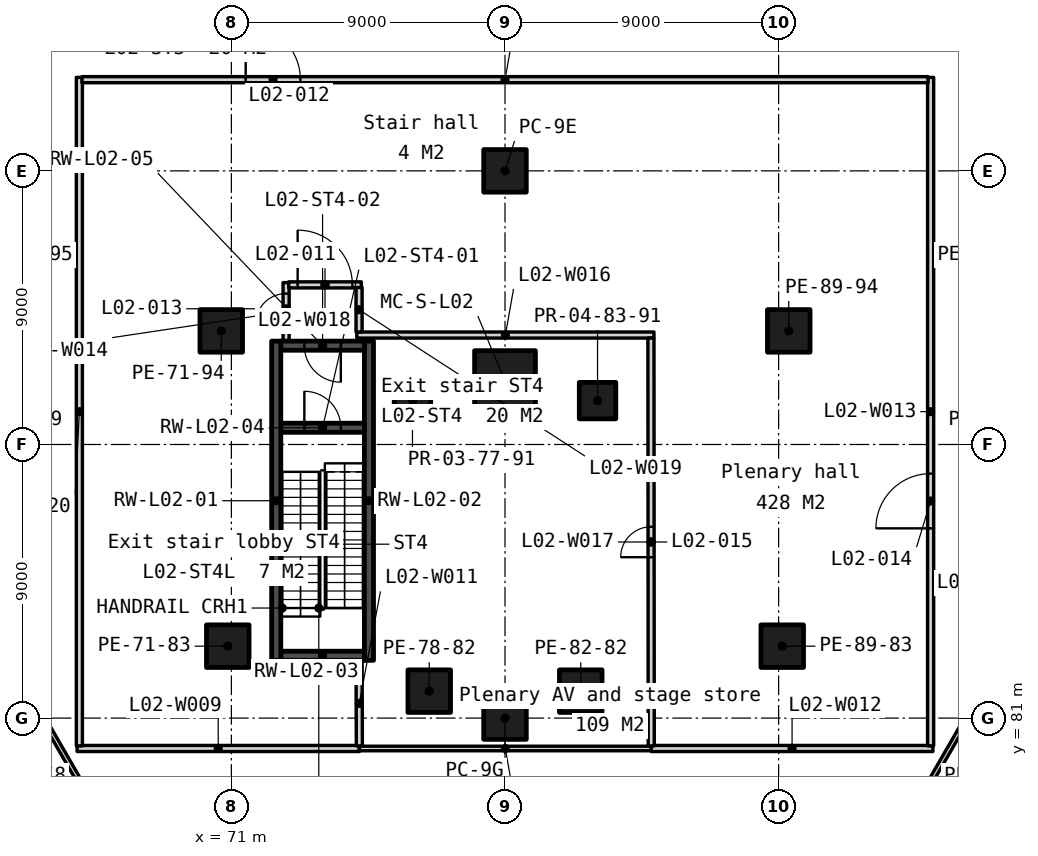
"""IFC4 building model, lengths in metres.
Left out: names, types, materials, properties, quantities, classifications, styles, units other than length and angle.
Written with IfcOpenShell. Run it as: python <this file> out.ifc"""

import sys

from ifc_helpers import new_model, si_unit, direction, frame, frame_2d, origin, origin_2d, place, context, subcontext, project, spatial, rectangle, extrude, element, fill, save


model = new_model("IFC4")
c1 = context("Model", 3, precision=1e-05, world=origin(), true_north=direction((0.0, 1.0)))
c2 = subcontext(c1, "Body", "Model", "MODEL_VIEW")
j1 = project(units=[si_unit("LENGTHUNIT", "METRE"), si_unit("PLANEANGLEUNIT", "RADIAN")], contexts=[c1])
p1 = place(None, origin())
s1 = spatial("IfcSite", under=j1, at=p1, CompositionType="ELEMENT")
p2 = place(p1, origin())
s2 = spatial("IfcBuilding", under=s1, at=p2, CompositionType="ELEMENT")
p3 = place(p2, frame((0.0, 0.0, 13.5)))
s3 = spatial("IfcBuildingStorey", under=s2, at=p3, CompositionType="ELEMENT", Elevation=13.5)
for number, where, z_axis, x_axis in (
    (1, (80.0, 99.0, 0.0), (0.0, 0.0, 1.0), (1.0, 0.0, 0.0)),
    (2, (80.0, 81.0, 0.0), (0.0, 0.0, 1.0), (1.0, 0.0, 0.0)),
    (3, (70.881, 83.366, 0.0), (0.0, 0.0, 1.0), (1.0, 0.0, 0.0)),
    (4, (70.667, 93.736, 0.0), (0.0, 0.0, 1.0), (1.0, 0.0, 0.0)),
    (5, (77.508, 81.886, 0.0), (0.0, 0.0, 1.0), (1.0, 0.0, 0.0)),
    (6, (82.492, 81.886, 0.0), (0.0, 0.0, 1.0), (1.0, 0.0, 0.0)),
    (7, (89.119, 83.366, 0.0), (0.0, 0.0, 1.0), (1.0, 0.0, 0.0)),
    (8, (89.333, 93.736, 0.0), (0.0, 0.0, 1.0), (1.0, 0.0, 0.0)),
):
    element("IfcColumn", number, at=place(p3, frame(where, z_axis=z_axis, x_axis=x_axis)), inside=s3, PredefinedType="COLUMN", context=c2, shape_type="SweptSolid", body=[
        extrude(rectangle(XDim=1.4, YDim=1.4, at=origin_2d()), origin(), (0.0, 0.0, 1.0), 6.0),
    ])
for number, where, z_axis, x_axis in (
    (9, (76.956, 91.442, 0.0), (0.0, 0.0, 1.0), (1.0, 0.0, 0.0)),
    (10, (83.044, 91.442, 0.0), (0.0, 0.0, 1.0), (1.0, 0.0, 0.0)),
):
    element("IfcColumn", number, at=place(p3, frame(where, z_axis=z_axis, x_axis=x_axis)), inside=s3, PredefinedType="COLUMN", context=c2, shape_type="SweptSolid", body=[
        extrude(rectangle(XDim=1.2, YDim=1.2, at=origin_2d()), origin(), (0.0, 0.0, 1.0), 6.0),
    ])
p4 = place(p3, frame((80.0, 92.086, 0.0), z_axis=(0.0, 0.0, 1.0), x_axis=(1.0, 0.0, 0.0)))
e11 = element("IfcColumn", 11, at=p4, inside=s3, PredefinedType="COLUMN", context=c2, shape_type="SweptSolid", body=[
    extrude(rectangle(XDim=2.0, YDim=2.0, at=origin_2d()), origin(), (0.0, 0.0, 1.0), 6.0),
])
for number, where, z_axis, x_axis in (
    (12, (72.475, 82.9, 0.0), (0.0, 0.0, 1.0), (0.0, 1.0, 0.0)),
    (13, (75.525, 82.9, 0.0), (0.0, 0.0, 1.0), (0.0, 1.0, 0.0)),
):
    element("IfcWall", number, at=place(p3, frame(where, z_axis=z_axis, x_axis=x_axis)), inside=s3, PredefinedType="SOLIDWALL", context=c2, shape_type="SweptSolid", body=[
        extrude(rectangle(XDim=10.5, YDim=0.3, at=frame_2d((5.25, 0.0))), origin(), (0.0, 0.0, 1.0), 5.75),
    ])
p5 = place(p3, frame((72.625, 83.05, 0.0), z_axis=(0.0, 0.0, 1.0), x_axis=(1.0, 0.0, 0.0)))
e14 = element("IfcWall", 14, at=p5, inside=s3, PredefinedType="SOLIDWALL", context=c2, shape_type="SweptSolid", body=[
    extrude(rectangle(XDim=2.75, YDim=0.3, at=frame_2d((1.375, 0.0))), origin(), (0.0, 0.0, 1.0), 5.75),
])
p6 = place(p3, frame((72.625, 90.55, 0.0), z_axis=(0.0, 0.0, 1.0), x_axis=(1.0, 0.0, 0.0)))
e15 = element("IfcWall", 15, at=p6, inside=s3, PredefinedType="SOLIDWALL", context=c2, shape_type="SweptSolid", body=[
    extrude(rectangle(XDim=2.75, YDim=0.3, at=frame_2d((1.375, 0.0))), origin(), (0.0, 0.0, 1.0), 5.75),
])
p7 = place(p6, frame((0.775, 0.0, 0.0)))
e16 = element("IfcOpeningElement", 16, at=p7, cuts=e15, PredefinedType="OPENING", context=c2, shape_type="SweptSolid", body=[
    extrude(rectangle(XDim=1.2, YDim=2.1, at=frame_2d((0.6, 1.05))), frame((0.0, 0.16, 0.0), z_axis=(0.0, -1.0, 0.0), x_axis=(1.0, 0.0, 0.0)), (0.0, 0.0, 1.0), 0.32),
])
p8 = place(p3, frame((72.625, 93.25, 0.0), z_axis=(0.0, 0.0, 1.0), x_axis=(1.0, 0.0, 0.0)))
e17 = element("IfcWall", 17, at=p8, inside=s3, PredefinedType="SOLIDWALL", context=c2, shape_type="SweptSolid", body=[
    extrude(rectangle(XDim=2.75, YDim=0.3, at=frame_2d((1.375, 0.0))), origin(), (0.0, 0.0, 1.0), 5.75),
])
p9 = place(p8, frame((0.775, 0.0, 0.0)))
e18 = element("IfcOpeningElement", 18, at=p9, cuts=e17, PredefinedType="OPENING", context=c2, shape_type="SweptSolid", body=[
    extrude(rectangle(XDim=1.2, YDim=2.1, at=frame_2d((0.6, 1.05))), frame((0.0, 0.16, 0.0), z_axis=(0.0, -1.0, 0.0), x_axis=(1.0, 0.0, 0.0)), (0.0, 0.0, 1.0), 0.32),
])
for number, where, z_axis, x_axis in (
    (19, (133.302, 129.091, 0.0), (0.0, 0.0, 1.0), (-0.5, -0.866, 0.0)),
    (20, (77.166, 41.679, 0.0), (0.0, 0.0, 1.0), (-0.5, 0.866, 0.0)),
):
    element("IfcWall", number, at=place(p3, frame(where, z_axis=z_axis, x_axis=x_axis)), inside=s3, PredefinedType="STANDARD", context=c2, shape_type="SweptSolid", body=[
        extrude(rectangle(XDim=100.935, YDim=1.0, at=frame_2d((50.467, 0.0))), origin(), (0.0, 0.0, 1.0), 0.6),
    ])
p10 = place(p3, frame((44.88, 115.5, 0.0), z_axis=(0.0, 0.0, 1.0), x_axis=(0.499996841654, -0.866027227249, 0.0)))
e21 = element("IfcWall", 21, at=p10, inside=s3, PredefinedType="PARTITIONING", context=c2, shape_type="SweptSolid", body=[
    extrude(rectangle(XDim=49.19, YDim=0.15, at=frame_2d((24.595, 0.0))), origin(), (0.0, 0.0, 1.0), 5.75),
])
p11 = place(p10, frame((23.695, 0.0, 0.0)))
e22 = element("IfcOpeningElement", 22, at=p11, cuts=e21, PredefinedType="OPENING", context=c2, shape_type="SweptSolid", body=[
    extrude(rectangle(XDim=1.8, YDim=2.1, at=frame_2d((0.9, 1.05))), frame((0.0, 0.085, 0.0), z_axis=(0.0, -1.0, 0.0), x_axis=(1.0, 0.0, 0.0)), (0.0, 0.0, 1.0), 0.17),
])
p12 = place(p3, frame((65.926, 80.0, 0.0), z_axis=(0.0, 0.0, 1.0), x_axis=(1.0, 0.0, 0.0)))
e23 = element("IfcWall", 23, at=p12, inside=s3, PredefinedType="PARTITIONING", context=c2, shape_type="SweptSolid", body=[
    extrude(rectangle(XDim=9.284, YDim=0.2, at=frame_2d((4.642, 0.0))), origin(), (0.0, 0.0, 1.0), 5.75),
])
p13 = place(p3, frame((75.21, 80.0, 0.0), z_axis=(0.0, 0.0, 1.0), x_axis=(1.0, 0.0, 0.0)))
e24 = element("IfcWall", 24, at=p13, inside=s3, PredefinedType="PARTITIONING", context=c2, shape_type="SweptSolid", body=[
    extrude(rectangle(XDim=9.6, YDim=0.15, at=frame_2d((4.8, 0.0))), origin(), (0.0, 0.0, 1.0), 5.75),
])
p14 = place(p3, frame((75.21, 80.085, 0.0), z_axis=(0.0, 0.0, 1.0), x_axis=(-0.003494038769, 0.999993895828, 0.0)))
e25 = element("IfcWall", 25, at=p14, inside=s3, PredefinedType="PARTITIONING", context=c2, shape_type="SweptSolid", body=[
    extrude(rectangle(XDim=2.795, YDim=0.2, at=frame_2d((1.397, 0.0))), origin(), (0.0, 0.0, 1.0), 5.75),
])
p15 = place(p3, frame((84.81, 80.0, 0.0), z_axis=(0.0, 0.0, 1.0), x_axis=(1.0, 0.0, 0.0)))
e26 = element("IfcWall", 26, at=p15, inside=s3, PredefinedType="PARTITIONING", context=c2, shape_type="SweptSolid", body=[
    extrude(rectangle(XDim=9.264, YDim=0.2, at=frame_2d((4.632, 0.0))), origin(), (0.0, 0.0, 1.0), 5.75),
])
p16 = place(p3, frame((94.0, 80.085, 0.0), z_axis=(0.0, 0.0, 1.0), x_axis=(2.2205198e-05, 0.999999999753, 0.0)))
e27 = element("IfcWall", 27, at=p16, inside=s3, PredefinedType="PARTITIONING", context=c2, shape_type="SweptSolid", body=[
    extrude(rectangle(XDim=21.99, YDim=0.2, at=frame_2d((10.995, 0.0))), origin(), (0.0, 0.0, 1.0), 5.75),
])
p17 = place(p16, frame((7.156, 0.0, 0.0)))
e28 = element("IfcOpeningElement", 28, at=p17, cuts=e27, PredefinedType="OPENING", context=c2, shape_type="SweptSolid", body=[
    extrude(rectangle(XDim=1.8, YDim=2.1, at=frame_2d((0.9, 1.05))), frame((0.0, 0.11, 0.0), z_axis=(0.0, -1.0, 0.0), x_axis=(1.0, 0.0, 0.0)), (0.0, 0.0, 1.0), 0.22),
])
p18 = place(p3, frame((72.8, 93.42, 0.0), z_axis=(0.0, 0.0, 1.0), x_axis=(0.0, 1.0, 0.0)))
e29 = element("IfcWall", 29, at=p18, inside=s3, PredefinedType="PARTITIONING", context=c2, shape_type="SweptSolid", body=[
    extrude(rectangle(XDim=1.905, YDim=0.2, at=frame_2d((0.953, 0.0))), origin(), (0.0, 0.0, 1.0), 4.889),
])
p19 = place(p18, frame((0.544, 0.0, 0.0)))
e30 = element("IfcOpeningElement", 30, at=p19, cuts=e29, PredefinedType="OPENING", context=c2, shape_type="SweptSolid", body=[
    extrude(rectangle(XDim=1.0, YDim=2.1, at=frame_2d((0.5, 1.05))), frame((0.0, 0.11, 0.0), z_axis=(0.0, -1.0, 0.0), x_axis=(1.0, 0.0, 0.0)), (0.0, 0.0, 1.0), 0.22),
])
p20 = place(p3, frame((75.125, 93.6, 0.0), z_axis=(0.0, 0.0, 1.0), x_axis=(1.0, 0.0, 0.0)))
e31 = element("IfcWall", 31, at=p20, inside=s3, PredefinedType="PARTITIONING", context=c2, shape_type="SweptSolid", body=[
    extrude(rectangle(XDim=9.775, YDim=0.2, at=frame_2d((4.887, 0.0))), origin(), (0.0, 0.0, 1.0), 4.889),
])
p21 = place(p3, frame((84.81, 80.085, 0.0), z_axis=(0.0, 0.0, 1.0), x_axis=(-0.000746159798, 0.999999721623, 0.0)))
e32 = element("IfcWall", 32, at=p21, inside=s3, PredefinedType="PARTITIONING", context=c2, shape_type="SweptSolid", body=[
    extrude(rectangle(XDim=13.415, YDim=0.2, at=frame_2d((6.708, 0.0))), origin(), (0.0, 0.0, 1.0), 5.75),
])
p22 = place(p21, frame((6.208, 0.0, 0.0)))
e33 = element("IfcOpeningElement", 33, at=p22, cuts=e32, PredefinedType="OPENING", context=c2, shape_type="SweptSolid", body=[
    extrude(rectangle(XDim=1.0, YDim=2.1, at=frame_2d((0.5, 1.05))), frame((0.0, 0.11, 0.0), z_axis=(0.0, -1.0, 0.0), x_axis=(1.0, 0.0, 0.0)), (0.0, 0.0, 1.0), 0.22),
])
p23 = place(p3, frame((72.885, 95.25, 0.0), z_axis=(0.0, 0.0, 1.0), x_axis=(1.0, 0.0, 0.0)))
e34 = element("IfcWall", 34, at=p23, inside=s3, PredefinedType="PARTITIONING", context=c2, shape_type="SweptSolid", body=[
    extrude(rectangle(XDim=2.39, YDim=0.2, at=frame_2d((1.195, 0.0))), origin(), (0.0, 0.0, 1.0), 5.75),
])
p24 = place(p23, frame((0.295, 0.0, 0.0)))
e35 = element("IfcOpeningElement", 35, at=p24, cuts=e34, PredefinedType="OPENING", context=c2, shape_type="SweptSolid", body=[
    extrude(rectangle(XDim=1.8, YDim=2.1, at=frame_2d((0.9, 1.05))), frame((0.0, 0.11, 0.0), z_axis=(0.0, -1.0, 0.0), x_axis=(1.0, 0.0, 0.0)), (0.0, 0.0, 1.0), 0.22),
])
p25 = place(p3, frame((75.2, 93.7, 0.0), z_axis=(0.0, 0.0, 1.0), x_axis=(0.0, 1.0, 0.0)))
e36 = element("IfcWall", 36, at=p25, inside=s3, PredefinedType="PARTITIONING", context=c2, shape_type="SweptSolid", body=[
    extrude(rectangle(XDim=1.465, YDim=0.2, at=frame_2d((0.732, 0.0))), origin(), (0.0, 0.0, 1.0), 5.75),
])
p26 = place(p3, frame((66.0, 80.085, 0.0), z_axis=(0.0, 0.0, 1.0), x_axis=(-2.2205198e-05, 0.999999999753, 0.0)))
e37 = element("IfcWall", 37, at=p26, inside=s3, PredefinedType="PARTITIONING", context=c2, shape_type="SweptSolid", body=[
    extrude(rectangle(XDim=21.99, YDim=0.2, at=frame_2d((10.995, 0.0))), origin(), (0.0, 0.0, 1.0), 5.75),
])
p27 = place(p3, frame((66.085, 102.0, 0.0), z_axis=(0.0, 0.0, 1.0), x_axis=(1.0, 0.0, 0.0)))
e38 = element("IfcWall", 38, at=p27, inside=s3, PredefinedType="PARTITIONING", context=c2, shape_type="SweptSolid", body=[
    extrude(rectangle(XDim=27.83, YDim=0.2, at=frame_2d((13.915, 0.0))), origin(), (0.0, 0.0, 1.0), 5.75),
])
p28 = place(p27, frame((5.386, 0.0, 0.0)))
e39 = element("IfcOpeningElement", 39, at=p28, cuts=e38, PredefinedType="OPENING", context=c2, shape_type="SweptSolid", body=[
    extrude(rectangle(XDim=1.8, YDim=2.1, at=frame_2d((0.9, 1.05))), frame((0.0, 0.11, 0.0), z_axis=(0.0, -1.0, 0.0), x_axis=(1.0, 0.0, 0.0)), (0.0, 0.0, 1.0), 0.22),
])
p29 = place(p3, frame((90.525, 72.9, 0.0), z_axis=(0.0, 0.0, 1.0), x_axis=(0.499997424756, 0.866026890597, 0.0)))
e40 = element("IfcWall", 40, at=p29, inside=s3, PredefinedType="PARTITIONING", context=c2, shape_type="SweptSolid", body=[
    extrude(rectangle(XDim=49.06, YDim=0.15, at=frame_2d((24.53, 0.0))), origin(), (0.0, 0.0, 1.0), 5.75),
])
p30 = place(p29, frame((11.965, 0.0, 0.0)))
e41 = element("IfcOpeningElement", 41, at=p30, cuts=e40, PredefinedType="OPENING", context=c2, shape_type="SweptSolid", body=[
    extrude(rectangle(XDim=1.8, YDim=2.1, at=frame_2d((0.9, 1.05))), frame((0.0, 0.085, 0.0), z_axis=(0.0, -1.0, 0.0), x_axis=(1.0, 0.0, 0.0)), (0.0, 0.0, 1.0), 0.17),
])
p31 = place(p7, origin())
e42 = element("IfcDoor", 42, at=p31, inside=s3, OperationType="SINGLE_SWING_LEFT", PredefinedType="DOOR", context=c2, shape_type="SweptSolid", body=[
    extrude(rectangle(XDim=1.2, YDim=2.1, at=frame_2d((0.6, 1.05))), frame((0.0, 0.025, 0.0), z_axis=(0.0, -1.0, 0.0), x_axis=(1.0, 0.0, 0.0)), (0.0, 0.0, 1.0), 0.05),
])
fill(e16, e42)
p32 = place(p9, origin())
e43 = element("IfcDoor", 43, at=p32, inside=s3, OperationType="SINGLE_SWING_RIGHT", PredefinedType="DOOR", context=c2, shape_type="SweptSolid", body=[
    extrude(rectangle(XDim=1.2, YDim=2.1, at=frame_2d((0.6, 1.05))), frame((0.0, 0.025, 0.0), z_axis=(0.0, -1.0, 0.0), x_axis=(1.0, 0.0, 0.0)), (0.0, 0.0, 1.0), 0.05),
])
fill(e18, e43)
p33 = place(p24, origin())
e44 = element("IfcDoor", 44, at=p33, inside=s3, OperationType="SINGLE_SWING_LEFT", PredefinedType="DOOR", context=c2, shape_type="SweptSolid", body=[
    extrude(rectangle(XDim=1.8, YDim=2.1, at=frame_2d((0.9, 1.05))), frame((0.0, 0.025, 0.0), z_axis=(0.0, -1.0, 0.0), x_axis=(1.0, 0.0, 0.0)), (0.0, 0.0, 1.0), 0.05),
])
fill(e35, e44)
p34 = place(p28, origin())
e45 = element("IfcDoor", 45, at=p34, inside=s3, OperationType="SINGLE_SWING_LEFT", PredefinedType="DOOR", context=c2, shape_type="SweptSolid", body=[
    extrude(rectangle(XDim=1.8, YDim=2.1, at=frame_2d((0.9, 1.05))), frame((0.0, 0.025, 0.0), z_axis=(0.0, -1.0, 0.0), x_axis=(1.0, 0.0, 0.0)), (0.0, 0.0, 1.0), 0.05),
])
fill(e39, e45)
p35 = place(p19, origin())
e46 = element("IfcDoor", 46, at=p35, inside=s3, OperationType="SINGLE_SWING_LEFT", PredefinedType="DOOR", context=c2, shape_type="SweptSolid", body=[
    extrude(rectangle(XDim=1.0, YDim=2.1, at=frame_2d((0.5, 1.05))), frame((0.0, 0.025, 0.0), z_axis=(0.0, -1.0, 0.0), x_axis=(1.0, 0.0, 0.0)), (0.0, 0.0, 1.0), 0.05),
])
fill(e30, e46)
p36 = place(p17, origin())
e47 = element("IfcDoor", 47, at=p36, inside=s3, OperationType="SINGLE_SWING_LEFT", PredefinedType="DOOR", context=c2, shape_type="SweptSolid", body=[
    extrude(rectangle(XDim=1.8, YDim=2.1, at=frame_2d((0.9, 1.05))), frame((0.0, 0.025, 0.0), z_axis=(0.0, -1.0, 0.0), x_axis=(1.0, 0.0, 0.0)), (0.0, 0.0, 1.0), 0.05),
])
fill(e28, e47)
p37 = place(p22, origin())
e48 = element("IfcDoor", 48, at=p37, inside=s3, OperationType="SINGLE_SWING_LEFT", PredefinedType="DOOR", context=c2, shape_type="SweptSolid", body=[
    extrude(rectangle(XDim=1.0, YDim=2.1, at=frame_2d((0.5, 1.05))), frame((0.0, 0.025, 0.0), z_axis=(0.0, -1.0, 0.0), x_axis=(1.0, 0.0, 0.0)), (0.0, 0.0, 1.0), 0.05),
])
fill(e33, e48)
save(model, sys.argv[1])
